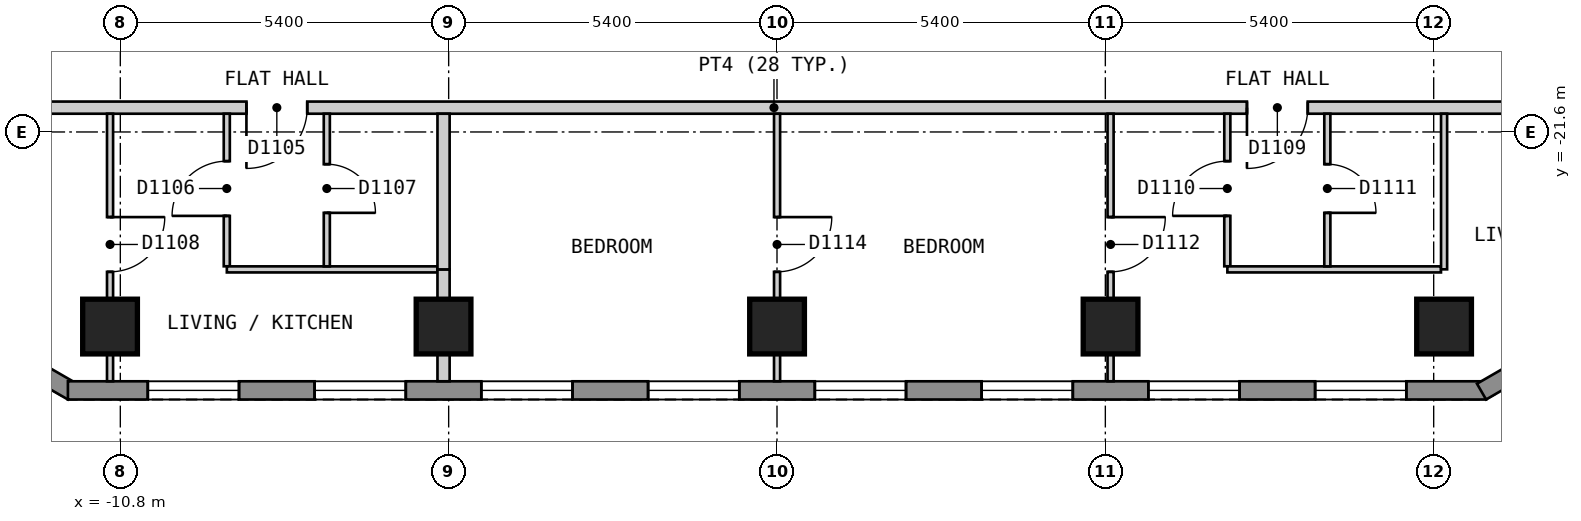
"""IFC4 building model, lengths in metres.
Left out: names, types, materials, properties, quantities, classifications, styles, units other than length and angle.
Written with IfcOpenShell. Run it as: python <this file> out.ifc"""

import sys

from ifc_helpers import new_model, si_unit, direction, frame, frame_2d, origin, origin_2d, place, context, subcontext, project, spatial, polyline, rectangle, outline, extrude, element, fill, save


model = new_model("IFC4")
c1 = context("Model", 3, precision=1e-05, world=origin(), true_north=direction((0.0, 1.0)))
c2 = subcontext(c1, "Body", "Model", "MODEL_VIEW")
j1 = project(units=[si_unit("LENGTHUNIT", "METRE"), si_unit("PLANEANGLEUNIT", "RADIAN")], contexts=[c1])
p1 = place(None, origin())
s1 = spatial("IfcSite", under=j1, at=p1, CompositionType="ELEMENT")
p2 = place(p1, origin())
s2 = spatial("IfcBuilding", under=s1, at=p2, CompositionType="ELEMENT")
p3 = place(p2, frame((0.0, 0.0, 138.6)))
s3 = spatial("IfcBuildingStorey", under=s2, at=p3, CompositionType="ELEMENT", Elevation=138.6)
for number, where, z_axis, x_axis in (
    (1, (-10.969, -24.8, 0.0), (0.0, 0.0, 1.0), (1.0, 0.0, 0.0)),
    (2, (-5.484, -24.8, 0.0), (0.0, 0.0, 1.0), (1.0, 0.0, 0.0)),
    (3, (0.001, -24.8, 0.0), (0.0, 0.0, 1.0), (1.0, 0.0, 0.0)),
    (4, (5.486, -24.8, 0.0), (0.0, 0.0, 1.0), (1.0, 0.0, 0.0)),
    (5, (10.971, -24.8, 0.0), (0.0, 0.0, 1.0), (1.0, 0.0, 0.0)),
):
    element("IfcColumn", number, at=place(p3, frame(where, z_axis=z_axis, x_axis=x_axis)), inside=s3, PredefinedType="COLUMN", context=c2, shape_type="SweptSolid", body=[
        extrude(rectangle(XDim=0.9, YDim=0.9, at=origin_2d()), origin(), (0.0, 0.0, 1.0), 3.0),
    ])
p4 = place(p3, frame((-15.917, -23.37, 0.0), z_axis=(0.0, 0.0, 1.0), x_axis=(0.866022959057, -0.500004234368, 0.0)))
e6 = element("IfcWall", 6, at=p4, inside=s3, PredefinedType="SOLIDWALL", context=c2, shape_type="SweptSolid", body=[
    extrude(outline(polyline([(0.0, -0.15), (5.0, -0.15), (4.92, 0.15), (0.08, 0.15), (0.0, -0.15)])), origin(), (0.0, 0.0, 1.0), 2.7),
])
p5 = place(p4, frame((0.65, 0.0, 0.15)))
e7 = element("IfcOpeningElement", 7, at=p5, cuts=e6, PredefinedType="OPENING", context=c2, shape_type="SweptSolid", body=[
    extrude(rectangle(XDim=1.2, YDim=2.1, at=frame_2d((0.6, 1.05))), frame((0.0, 0.16, 0.0), z_axis=(0.0, -1.0, 0.0), x_axis=(1.0, 0.0, 0.0)), (0.0, 0.0, 1.0), 0.32),
])
p6 = place(p4, frame((3.15, 0.0, 0.15)))
e8 = element("IfcOpeningElement", 8, at=p6, cuts=e6, PredefinedType="OPENING", context=c2, shape_type="SweptSolid", body=[
    extrude(rectangle(XDim=1.2, YDim=2.1, at=frame_2d((0.6, 1.05))), frame((0.0, 0.16, 0.0), z_axis=(0.0, -1.0, 0.0), x_axis=(1.0, 0.0, 0.0)), (0.0, 0.0, 1.0), 0.32),
])
p7 = place(p3, frame((-11.662, -25.85, 0.0), z_axis=(0.0, 0.0, 1.0), x_axis=(1.0, 0.0, 0.0)))
e9 = element("IfcWall", 9, at=p7, inside=s3, PredefinedType="SOLIDWALL", context=c2, shape_type="SweptSolid", body=[
    extrude(outline(polyline([(0.0, -0.15), (23.324, -0.15), (23.244, 0.15), (0.08, 0.15), (0.0, -0.15)])), origin(), (0.0, 0.0, 1.0), 2.7),
])
p8 = place(p7, frame((1.314, 0.0, 0.15)))
e10 = element("IfcOpeningElement", 10, at=p8, cuts=e9, PredefinedType="OPENING", context=c2, shape_type="SweptSolid", body=[
    extrude(rectangle(XDim=1.5, YDim=2.1, at=frame_2d((0.75, 1.05))), frame((0.0, 0.16, 0.0), z_axis=(0.0, -1.0, 0.0), x_axis=(1.0, 0.0, 0.0)), (0.0, 0.0, 1.0), 0.32),
])
p9 = place(p7, frame((4.057, 0.0, 0.15)))
e11 = element("IfcOpeningElement", 11, at=p9, cuts=e9, PredefinedType="OPENING", context=c2, shape_type="SweptSolid", body=[
    extrude(rectangle(XDim=1.5, YDim=2.1, at=frame_2d((0.75, 1.05))), frame((0.0, 0.16, 0.0), z_axis=(0.0, -1.0, 0.0), x_axis=(1.0, 0.0, 0.0)), (0.0, 0.0, 1.0), 0.32),
])
p10 = place(p7, frame((6.799, 0.0, 0.15)))
e12 = element("IfcOpeningElement", 12, at=p10, cuts=e9, PredefinedType="OPENING", context=c2, shape_type="SweptSolid", body=[
    extrude(rectangle(XDim=1.5, YDim=2.1, at=frame_2d((0.75, 1.05))), frame((0.0, 0.16, 0.0), z_axis=(0.0, -1.0, 0.0), x_axis=(1.0, 0.0, 0.0)), (0.0, 0.0, 1.0), 0.32),
])
p11 = place(p7, frame((9.542, 0.0, 0.15)))
e13 = element("IfcOpeningElement", 13, at=p11, cuts=e9, PredefinedType="OPENING", context=c2, shape_type="SweptSolid", body=[
    extrude(rectangle(XDim=1.5, YDim=2.1, at=frame_2d((0.75, 1.05))), frame((0.0, 0.16, 0.0), z_axis=(0.0, -1.0, 0.0), x_axis=(1.0, 0.0, 0.0)), (0.0, 0.0, 1.0), 0.32),
])
p12 = place(p7, frame((12.284, 0.0, 0.15)))
e14 = element("IfcOpeningElement", 14, at=p12, cuts=e9, PredefinedType="OPENING", context=c2, shape_type="SweptSolid", body=[
    extrude(rectangle(XDim=1.5, YDim=2.1, at=frame_2d((0.75, 1.05))), frame((0.0, 0.16, 0.0), z_axis=(0.0, -1.0, 0.0), x_axis=(1.0, 0.0, 0.0)), (0.0, 0.0, 1.0), 0.32),
])
p13 = place(p7, frame((15.027, 0.0, 0.15)))
e15 = element("IfcOpeningElement", 15, at=p13, cuts=e9, PredefinedType="OPENING", context=c2, shape_type="SweptSolid", body=[
    extrude(rectangle(XDim=1.5, YDim=2.1, at=frame_2d((0.75, 1.05))), frame((0.0, 0.16, 0.0), z_axis=(0.0, -1.0, 0.0), x_axis=(1.0, 0.0, 0.0)), (0.0, 0.0, 1.0), 0.32),
])
p14 = place(p7, frame((17.769, 0.0, 0.15)))
e16 = element("IfcOpeningElement", 16, at=p14, cuts=e9, PredefinedType="OPENING", context=c2, shape_type="SweptSolid", body=[
    extrude(rectangle(XDim=1.5, YDim=2.1, at=frame_2d((0.75, 1.05))), frame((0.0, 0.16, 0.0), z_axis=(0.0, -1.0, 0.0), x_axis=(1.0, 0.0, 0.0)), (0.0, 0.0, 1.0), 0.32),
])
p15 = place(p7, frame((20.512, 0.0, 0.15)))
e17 = element("IfcOpeningElement", 17, at=p15, cuts=e9, PredefinedType="OPENING", context=c2, shape_type="SweptSolid", body=[
    extrude(rectangle(XDim=1.5, YDim=2.1, at=frame_2d((0.75, 1.05))), frame((0.0, 0.16, 0.0), z_axis=(0.0, -1.0, 0.0), x_axis=(1.0, 0.0, 0.0)), (0.0, 0.0, 1.0), 0.32),
])
p16 = place(p3, frame((11.587, -25.87, 0.0), z_axis=(0.0, 0.0, 1.0), x_axis=(0.866022959057, 0.500004234368, 0.0)))
e18 = element("IfcWall", 18, at=p16, inside=s3, PredefinedType="SOLIDWALL", context=c2, shape_type="SweptSolid", body=[
    extrude(outline(polyline([(0.0, -0.15), (5.0, -0.15), (4.92, 0.15), (0.08, 0.15), (0.0, -0.15)])), origin(), (0.0, 0.0, 1.0), 2.7),
])
p17 = place(p16, frame((0.65, 0.0, 0.15)))
e19 = element("IfcOpeningElement", 19, at=p17, cuts=e18, PredefinedType="OPENING", context=c2, shape_type="SweptSolid", body=[
    extrude(rectangle(XDim=1.2, YDim=2.1, at=frame_2d((0.6, 1.05))), frame((0.0, 0.16, 0.0), z_axis=(0.0, -1.0, 0.0), x_axis=(1.0, 0.0, 0.0)), (0.0, 0.0, 1.0), 0.32),
])
p18 = place(p16, frame((3.149, 0.0, 0.15)))
e20 = element("IfcOpeningElement", 20, at=p18, cuts=e18, PredefinedType="OPENING", context=c2, shape_type="SweptSolid", body=[
    extrude(rectangle(XDim=1.2, YDim=2.1, at=frame_2d((0.6, 1.05))), frame((0.0, 0.16, 0.0), z_axis=(0.0, -1.0, 0.0), x_axis=(1.0, 0.0, 0.0)), (0.0, 0.0, 1.0), 0.32),
])
p19 = place(p3, frame((-15.499, -21.2, 0.0), z_axis=(0.0, 0.0, 1.0), x_axis=(1.0, 0.0, 0.0)))
e21 = element("IfcWall", 21, at=p19, inside=s3, PredefinedType="PARTITIONING", context=c2, shape_type="SweptSolid", body=[
    extrude(rectangle(XDim=30.898, YDim=0.2, at=frame_2d((15.449, 0.0))), origin(), (0.0, 0.0, 1.0), 2.7),
])
p20 = place(p19, frame((6.773, 0.0, 0.0)))
e22 = element("IfcOpeningElement", 22, at=p20, cuts=e21, PredefinedType="OPENING", context=c2, shape_type="SweptSolid", body=[
    extrude(rectangle(XDim=1.0, YDim=2.1, at=frame_2d((0.5, 1.05))), frame((0.0, 0.11, 0.0), z_axis=(0.0, -1.0, 0.0), x_axis=(1.0, 0.0, 0.0)), (0.0, 0.0, 1.0), 0.22),
])
p21 = place(p19, frame((23.228, 0.0, 0.0)))
e23 = element("IfcOpeningElement", 23, at=p21, cuts=e21, PredefinedType="OPENING", context=c2, shape_type="SweptSolid", body=[
    extrude(rectangle(XDim=1.0, YDim=2.1, at=frame_2d((0.5, 1.05))), frame((0.0, 0.11, 0.0), z_axis=(0.0, -1.0, 0.0), x_axis=(1.0, 0.0, 0.0)), (0.0, 0.0, 1.0), 0.22),
])
p22 = place(p3, frame((-9.049, -21.3, 0.0), z_axis=(0.0, 0.0, 1.0), x_axis=(0.0, -1.0, 0.0)))
e24 = element("IfcWall", 24, at=p22, inside=s3, PredefinedType="PARTITIONING", context=c2, shape_type="SweptSolid", body=[
    extrude(rectangle(XDim=2.509, YDim=0.1, at=frame_2d((1.254, 0.0))), origin(), (0.0, 0.0, 1.0), 2.7),
])
p23 = place(p22, frame((0.78, 0.0, 0.0)))
e25 = element("IfcOpeningElement", 25, at=p23, cuts=e24, PredefinedType="OPENING", context=c2, shape_type="SweptSolid", body=[
    extrude(rectangle(XDim=0.9, YDim=2.1, at=frame_2d((0.45, 1.05))), frame((0.0, 0.06, 0.0), z_axis=(0.0, -1.0, 0.0), x_axis=(1.0, 0.0, 0.0)), (0.0, 0.0, 1.0), 0.12),
])
p24 = place(p3, frame((7.406, -21.3, 0.0), z_axis=(0.0, 0.0, 1.0), x_axis=(0.0, -1.0, 0.0)))
e26 = element("IfcWall", 26, at=p24, inside=s3, PredefinedType="PARTITIONING", context=c2, shape_type="SweptSolid", body=[
    extrude(rectangle(XDim=2.509, YDim=0.1, at=frame_2d((1.254, 0.0))), origin(), (0.0, 0.0, 1.0), 2.7),
])
p25 = place(p24, frame((0.78, 0.0, 0.0)))
e27 = element("IfcOpeningElement", 27, at=p25, cuts=e26, PredefinedType="OPENING", context=c2, shape_type="SweptSolid", body=[
    extrude(rectangle(XDim=0.9, YDim=2.1, at=frame_2d((0.45, 1.05))), frame((0.0, 0.06, 0.0), z_axis=(0.0, -1.0, 0.0), x_axis=(1.0, 0.0, 0.0)), (0.0, 0.0, 1.0), 0.12),
])
p26 = place(p3, frame((-9.048, -23.86, 0.0), z_axis=(0.0, 0.0, 1.0), x_axis=(1.0, 0.0, 0.0)))
e28 = element("IfcWall", 28, at=p26, inside=s3, PredefinedType="PARTITIONING", context=c2, shape_type="SweptSolid", body=[
    extrude(rectangle(XDim=3.464, YDim=0.1, at=frame_2d((1.732, 0.0))), origin(), (0.0, 0.0, 1.0), 2.7),
])
p27 = place(p3, frame((7.407, -23.86, 0.0), z_axis=(0.0, 0.0, 1.0), x_axis=(1.0, 0.0, 0.0)))
e29 = element("IfcWall", 29, at=p27, inside=s3, PredefinedType="PARTITIONING", context=c2, shape_type="SweptSolid", body=[
    extrude(rectangle(XDim=3.513, YDim=0.1, at=frame_2d((1.756, 0.0))), origin(), (0.0, 0.0, 1.0), 2.7),
])
p28 = place(p3, frame((5.486, -25.7, 0.0), z_axis=(0.0, 0.0, 1.0), x_axis=(0.0, 1.0, 0.0)))
e30 = element("IfcWall", 30, at=p28, inside=s3, PredefinedType="PARTITIONING", context=c2, shape_type="SweptSolid", body=[
    extrude(rectangle(XDim=4.4, YDim=0.1, at=frame_2d((2.2, 0.0))), origin(), (0.0, 0.0, 1.0), 2.7),
])
p29 = place(p28, frame((1.8, 0.0, 0.0)))
e31 = element("IfcOpeningElement", 31, at=p29, cuts=e30, PredefinedType="OPENING", context=c2, shape_type="SweptSolid", body=[
    extrude(rectangle(XDim=0.9, YDim=2.1, at=frame_2d((0.45, 1.05))), frame((0.0, 0.06, 0.0), z_axis=(0.0, -1.0, 0.0), x_axis=(1.0, 0.0, 0.0)), (0.0, 0.0, 1.0), 0.12),
])
p30 = place(p3, frame((9.051, -23.81, 0.0), z_axis=(0.0, 0.0, 1.0), x_axis=(0.0, 1.0, 0.0)))
e32 = element("IfcWall", 32, at=p30, inside=s3, PredefinedType="PARTITIONING", context=c2, shape_type="SweptSolid", body=[
    extrude(rectangle(XDim=2.51, YDim=0.1, at=frame_2d((1.255, 0.0))), origin(), (0.0, 0.0, 1.0), 2.7),
])
p31 = place(p30, frame((0.88, 0.0, 0.0)))
e33 = element("IfcOpeningElement", 33, at=p31, cuts=e32, PredefinedType="OPENING", context=c2, shape_type="SweptSolid", body=[
    extrude(rectangle(XDim=0.8, YDim=2.1, at=frame_2d((0.4, 1.05))), frame((0.0, 0.06, 0.0), z_axis=(0.0, -1.0, 0.0), x_axis=(1.0, 0.0, 0.0)), (0.0, 0.0, 1.0), 0.12),
])
p32 = place(p3, frame((10.971, -23.859, 0.0), z_axis=(0.0, 0.0, 1.0), x_axis=(0.0, 1.0, 0.0)))
e34 = element("IfcWall", 34, at=p32, inside=s3, PredefinedType="PARTITIONING", context=c2, shape_type="SweptSolid", body=[
    extrude(rectangle(XDim=2.559, YDim=0.1, at=frame_2d((1.279, 0.0))), origin(), (0.0, 0.0, 1.0), 2.7),
])
p33 = place(p3, frame((0.001, -25.7, 0.0), z_axis=(0.0, 0.0, 1.0), x_axis=(0.0, 1.0, 0.0)))
e35 = element("IfcWall", 35, at=p33, inside=s3, PredefinedType="PARTITIONING", context=c2, shape_type="SweptSolid", body=[
    extrude(rectangle(XDim=4.4, YDim=0.1, at=frame_2d((2.2, 0.0))), origin(), (0.0, 0.0, 1.0), 2.7),
])
p34 = place(p33, frame((1.8, 0.0, 0.0)))
e36 = element("IfcOpeningElement", 36, at=p34, cuts=e35, PredefinedType="OPENING", context=c2, shape_type="SweptSolid", body=[
    extrude(rectangle(XDim=0.9, YDim=2.1, at=frame_2d((0.45, 1.05))), frame((0.0, 0.06, 0.0), z_axis=(0.0, -1.0, 0.0), x_axis=(1.0, 0.0, 0.0)), (0.0, 0.0, 1.0), 0.12),
])
p35 = place(p3, frame((-7.404, -23.81, 0.0), z_axis=(0.0, 0.0, 1.0), x_axis=(0.0, 1.0, 0.0)))
e37 = element("IfcWall", 37, at=p35, inside=s3, PredefinedType="PARTITIONING", context=c2, shape_type="SweptSolid", body=[
    extrude(rectangle(XDim=2.51, YDim=0.1, at=frame_2d((1.255, 0.0))), origin(), (0.0, 0.0, 1.0), 2.7),
])
p36 = place(p35, frame((0.88, 0.0, 0.0)))
e38 = element("IfcOpeningElement", 38, at=p36, cuts=e37, PredefinedType="OPENING", context=c2, shape_type="SweptSolid", body=[
    extrude(rectangle(XDim=0.8, YDim=2.1, at=frame_2d((0.4, 1.05))), frame((0.0, 0.06, 0.0), z_axis=(0.0, -1.0, 0.0), x_axis=(1.0, 0.0, 0.0)), (0.0, 0.0, 1.0), 0.12),
])
p37 = place(p3, frame((-10.969, -25.7, 0.0), z_axis=(0.0, 0.0, 1.0), x_axis=(0.0, 1.0, 0.0)))
e39 = element("IfcWall", 39, at=p37, inside=s3, PredefinedType="PARTITIONING", context=c2, shape_type="SweptSolid", body=[
    extrude(rectangle(XDim=4.4, YDim=0.1, at=frame_2d((2.2, 0.0))), origin(), (0.0, 0.0, 1.0), 2.7),
])
p38 = place(p37, frame((1.8, 0.0, 0.0)))
e40 = element("IfcOpeningElement", 40, at=p38, cuts=e39, PredefinedType="OPENING", context=c2, shape_type="SweptSolid", body=[
    extrude(rectangle(XDim=0.9, YDim=2.1, at=frame_2d((0.45, 1.05))), frame((0.0, 0.06, 0.0), z_axis=(0.0, -1.0, 0.0), x_axis=(1.0, 0.0, 0.0)), (0.0, 0.0, 1.0), 0.12),
])
p39 = place(p3, frame((-5.484, -23.86, 0.0), z_axis=(0.0, 0.0, 1.0), x_axis=(0.0, -1.0, 0.0)))
e41 = element("IfcWall", 41, at=p39, inside=s3, PredefinedType="PARTITIONING", context=c2, shape_type="SweptSolid", body=[
    extrude(rectangle(XDim=1.84, YDim=0.2, at=frame_2d((0.92, 0.0))), origin(), (0.0, 0.0, 1.0), 2.7),
])
p40 = place(p3, frame((-5.484, -23.86, 0.0), z_axis=(0.0, 0.0, 1.0), x_axis=(0.0, 1.0, 0.0)))
e42 = element("IfcWall", 42, at=p40, inside=s3, PredefinedType="PARTITIONING", context=c2, shape_type="SweptSolid", body=[
    extrude(rectangle(XDim=2.56, YDim=0.2, at=frame_2d((1.28, 0.0))), origin(), (0.0, 0.0, 1.0), 2.7),
])
p41 = place(p8, origin())
e43 = element("IfcWindow", 43, at=p41, inside=s3, PartitioningType="SINGLE_PANEL", PredefinedType="WINDOW", context=c2, shape_type="SweptSolid", body=[
    extrude(rectangle(XDim=1.5, YDim=2.1, at=frame_2d((0.75, 1.05))), frame((0.0, 0.03, 0.0), z_axis=(0.0, -1.0, 0.0), x_axis=(1.0, 0.0, 0.0)), (0.0, 0.0, 1.0), 0.06),
])
fill(e10, e43)
p42 = place(p9, origin())
e44 = element("IfcWindow", 44, at=p42, inside=s3, PartitioningType="SINGLE_PANEL", PredefinedType="WINDOW", context=c2, shape_type="SweptSolid", body=[
    extrude(rectangle(XDim=1.5, YDim=2.1, at=frame_2d((0.75, 1.05))), frame((0.0, 0.03, 0.0), z_axis=(0.0, -1.0, 0.0), x_axis=(1.0, 0.0, 0.0)), (0.0, 0.0, 1.0), 0.06),
])
fill(e11, e44)
p43 = place(p10, origin())
e45 = element("IfcWindow", 45, at=p43, inside=s3, PartitioningType="SINGLE_PANEL", PredefinedType="WINDOW", context=c2, shape_type="SweptSolid", body=[
    extrude(rectangle(XDim=1.5, YDim=2.1, at=frame_2d((0.75, 1.05))), frame((0.0, 0.03, 0.0), z_axis=(0.0, -1.0, 0.0), x_axis=(1.0, 0.0, 0.0)), (0.0, 0.0, 1.0), 0.06),
])
fill(e12, e45)
p44 = place(p11, origin())
e46 = element("IfcWindow", 46, at=p44, inside=s3, PartitioningType="SINGLE_PANEL", PredefinedType="WINDOW", context=c2, shape_type="SweptSolid", body=[
    extrude(rectangle(XDim=1.5, YDim=2.1, at=frame_2d((0.75, 1.05))), frame((0.0, 0.03, 0.0), z_axis=(0.0, -1.0, 0.0), x_axis=(1.0, 0.0, 0.0)), (0.0, 0.0, 1.0), 0.06),
])
fill(e13, e46)
p45 = place(p12, origin())
e47 = element("IfcWindow", 47, at=p45, inside=s3, PartitioningType="SINGLE_PANEL", PredefinedType="WINDOW", context=c2, shape_type="SweptSolid", body=[
    extrude(rectangle(XDim=1.5, YDim=2.1, at=frame_2d((0.75, 1.05))), frame((0.0, 0.03, 0.0), z_axis=(0.0, -1.0, 0.0), x_axis=(1.0, 0.0, 0.0)), (0.0, 0.0, 1.0), 0.06),
])
fill(e14, e47)
p46 = place(p13, origin())
e48 = element("IfcWindow", 48, at=p46, inside=s3, PartitioningType="SINGLE_PANEL", PredefinedType="WINDOW", context=c2, shape_type="SweptSolid", body=[
    extrude(rectangle(XDim=1.5, YDim=2.1, at=frame_2d((0.75, 1.05))), frame((0.0, 0.03, 0.0), z_axis=(0.0, -1.0, 0.0), x_axis=(1.0, 0.0, 0.0)), (0.0, 0.0, 1.0), 0.06),
])
fill(e15, e48)
p47 = place(p14, origin())
e49 = element("IfcWindow", 49, at=p47, inside=s3, PartitioningType="SINGLE_PANEL", PredefinedType="WINDOW", context=c2, shape_type="SweptSolid", body=[
    extrude(rectangle(XDim=1.5, YDim=2.1, at=frame_2d((0.75, 1.05))), frame((0.0, 0.03, 0.0), z_axis=(0.0, -1.0, 0.0), x_axis=(1.0, 0.0, 0.0)), (0.0, 0.0, 1.0), 0.06),
])
fill(e16, e49)
p48 = place(p15, origin())
e50 = element("IfcWindow", 50, at=p48, inside=s3, PartitioningType="SINGLE_PANEL", PredefinedType="WINDOW", context=c2, shape_type="SweptSolid", body=[
    extrude(rectangle(XDim=1.5, YDim=2.1, at=frame_2d((0.75, 1.05))), frame((0.0, 0.03, 0.0), z_axis=(0.0, -1.0, 0.0), x_axis=(1.0, 0.0, 0.0)), (0.0, 0.0, 1.0), 0.06),
])
fill(e17, e50)
p49 = place(p20, origin())
e51 = element("IfcDoor", 51, at=p49, inside=s3, OperationType="SINGLE_SWING_LEFT", PredefinedType="DOOR", context=c2, shape_type="SweptSolid", body=[
    extrude(rectangle(XDim=1.0, YDim=2.1, at=frame_2d((0.5, 1.05))), frame((0.0, 0.025, 0.0), z_axis=(0.0, -1.0, 0.0), x_axis=(1.0, 0.0, 0.0)), (0.0, 0.0, 1.0), 0.05),
])
fill(e22, e51)
p50 = place(p23, origin())
e52 = element("IfcDoor", 52, at=p50, inside=s3, OperationType="SINGLE_SWING_RIGHT", PredefinedType="DOOR", context=c2, shape_type="SweptSolid", body=[
    extrude(rectangle(XDim=0.9, YDim=2.1, at=frame_2d((0.45, 1.05))), frame((0.0, 0.025, 0.0), z_axis=(0.0, -1.0, 0.0), x_axis=(1.0, 0.0, 0.0)), (0.0, 0.0, 1.0), 0.05),
])
fill(e25, e52)
p51 = place(p36, origin())
e53 = element("IfcDoor", 53, at=p51, inside=s3, OperationType="SINGLE_SWING_LEFT", PredefinedType="DOOR", context=c2, shape_type="SweptSolid", body=[
    extrude(rectangle(XDim=0.8, YDim=2.1, at=frame_2d((0.4, 1.05))), frame((0.0, 0.025, 0.0), z_axis=(0.0, -1.0, 0.0), x_axis=(1.0, 0.0, 0.0)), (0.0, 0.0, 1.0), 0.05),
])
fill(e38, e53)
p52 = place(p38, origin())
e54 = element("IfcDoor", 54, at=p52, inside=s3, OperationType="SINGLE_SWING_RIGHT", PredefinedType="DOOR", context=c2, shape_type="SweptSolid", body=[
    extrude(rectangle(XDim=0.9, YDim=2.1, at=frame_2d((0.45, 1.05))), frame((0.0, 0.025, 0.0), z_axis=(0.0, -1.0, 0.0), x_axis=(1.0, 0.0, 0.0)), (0.0, 0.0, 1.0), 0.05),
])
fill(e40, e54)
p53 = place(p21, origin())
e55 = element("IfcDoor", 55, at=p53, inside=s3, OperationType="SINGLE_SWING_LEFT", PredefinedType="DOOR", context=c2, shape_type="SweptSolid", body=[
    extrude(rectangle(XDim=1.0, YDim=2.1, at=frame_2d((0.5, 1.05))), frame((0.0, 0.025, 0.0), z_axis=(0.0, -1.0, 0.0), x_axis=(1.0, 0.0, 0.0)), (0.0, 0.0, 1.0), 0.05),
])
fill(e23, e55)
p54 = place(p25, origin())
e56 = element("IfcDoor", 56, at=p54, inside=s3, OperationType="SINGLE_SWING_RIGHT", PredefinedType="DOOR", context=c2, shape_type="SweptSolid", body=[
    extrude(rectangle(XDim=0.9, YDim=2.1, at=frame_2d((0.45, 1.05))), frame((0.0, 0.025, 0.0), z_axis=(0.0, -1.0, 0.0), x_axis=(1.0, 0.0, 0.0)), (0.0, 0.0, 1.0), 0.05),
])
fill(e27, e56)
p55 = place(p31, origin())
e57 = element("IfcDoor", 57, at=p55, inside=s3, OperationType="SINGLE_SWING_LEFT", PredefinedType="DOOR", context=c2, shape_type="SweptSolid", body=[
    extrude(rectangle(XDim=0.8, YDim=2.1, at=frame_2d((0.4, 1.05))), frame((0.0, 0.025, 0.0), z_axis=(0.0, -1.0, 0.0), x_axis=(1.0, 0.0, 0.0)), (0.0, 0.0, 1.0), 0.05),
])
fill(e33, e57)
p56 = place(p29, origin())
e58 = element("IfcDoor", 58, at=p56, inside=s3, OperationType="SINGLE_SWING_RIGHT", PredefinedType="DOOR", context=c2, shape_type="SweptSolid", body=[
    extrude(rectangle(XDim=0.9, YDim=2.1, at=frame_2d((0.45, 1.05))), frame((0.0, 0.025, 0.0), z_axis=(0.0, -1.0, 0.0), x_axis=(1.0, 0.0, 0.0)), (0.0, 0.0, 1.0), 0.05),
])
fill(e31, e58)
p57 = place(p34, origin())
e59 = element("IfcDoor", 59, at=p57, inside=s3, OperationType="SINGLE_SWING_RIGHT", PredefinedType="DOOR", context=c2, shape_type="SweptSolid", body=[
    extrude(rectangle(XDim=0.9, YDim=2.1, at=frame_2d((0.45, 1.05))), frame((0.0, 0.025, 0.0), z_axis=(0.0, -1.0, 0.0), x_axis=(1.0, 0.0, 0.0)), (0.0, 0.0, 1.0), 0.05),
])
fill(e36, e59)
save(model, sys.argv[1])
